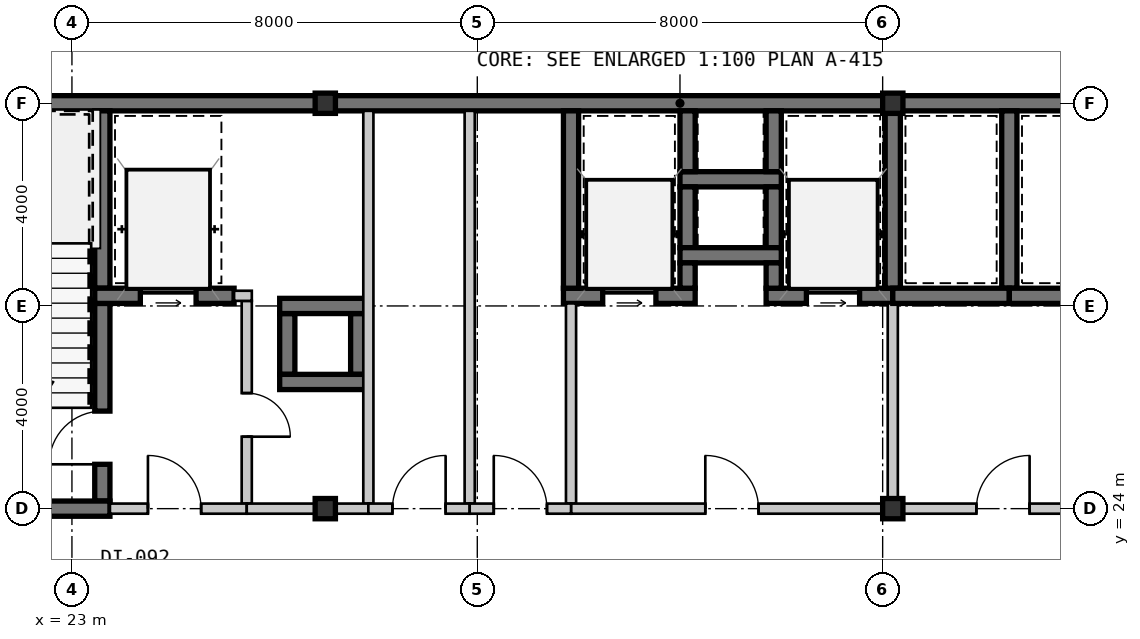
"""IFC4 building model, lengths in metres.
Left out: names, types, materials, properties, quantities, classifications, styles, units other than length and angle.
Written with IfcOpenShell. Run it as: python <this file> out.ifc"""

import sys

from ifc_helpers import new_model, si_unit, direction, frame, frame_2d, origin, origin_2d, place, context, subcontext, project, spatial, rectangle, hollow_rectangle, extrude, source, transform, mapped, element, fill, save


model = new_model("IFC4")
c1 = context("Model", 3, precision=1e-05, world=origin(), true_north=direction((0.0, 1.0)))
c2 = subcontext(c1, "Body", "Model", "MODEL_VIEW")
j1 = project(units=[si_unit("LENGTHUNIT", "METRE"), si_unit("PLANEANGLEUNIT", "RADIAN")], contexts=[c1])
p1 = place(None, origin())
s1 = spatial("IfcSite", under=j1, at=p1, CompositionType="ELEMENT")
p2 = place(p1, origin())
s2 = spatial("IfcBuilding", under=s1, at=p2, CompositionType="ELEMENT")
p3 = place(p2, frame((0.0, 0.0, 151.9)))
s3 = spatial("IfcBuildingStorey", under=s2, at=p3, CompositionType="ELEMENT", Elevation=151.9)
m1 = source(origin(), c2, "Body", "SweptSolid", [
    extrude(hollow_rectangle(XDim=0.4, YDim=0.4, WallThickness=0.016, at=origin_2d()), origin(), (0.0, 0.0, 1.0), 3.15),
])
for number, where, z_axis, x_axis in (
    (1, (28.0, 24.0, 0.0), (0.0, 0.0, 1.0), (1.0, 0.0, 0.0)),
    (2, (39.2, 24.0, 0.0), (0.0, 0.0, 1.0), (1.0, 0.0, 0.0)),
    (3, (28.0, 32.0, 0.0), (0.0, 0.0, 1.0), (1.0, 0.0, 0.0)),
    (4, (39.2, 32.0, 0.0), (0.0, 0.0, 1.0), (1.0, 0.0, 0.0)),
):
    element("IfcColumn", number, at=place(p3, frame(where, z_axis=z_axis, x_axis=x_axis)), inside=s3, PredefinedType="COLUMN", context=c2, shape_type="MappedRepresentation", body=[
        mapped(m1, transform((0.0, 0.0, 0.0), scale=1.0)),
    ])
m2 = source(origin(), c2, "Body", "SweptSolid", [
    extrude(rectangle(XDim=9.15, YDim=0.3, at=frame_2d((4.575, 0.0))), origin(), (0.0, 0.0, 1.0), 2.93),
])
p4 = place(p3, frame((18.85, 32.0, 0.0), z_axis=(0.0, 0.0, 1.0), x_axis=(1.0, 0.0, 0.0)))
e5 = element("IfcWall", 5, at=p4, inside=s3, PredefinedType="SHEAR", context=c2, shape_type="MappedRepresentation", body=[
    mapped(m2, transform((0.0, 0.0, 0.0), scale=1.0)),
])
m3 = source(origin(), c2, "Body", "SweptSolid", [
    extrude(rectangle(XDim=11.2, YDim=0.3, at=frame_2d((5.6, 0.0))), origin(), (0.0, 0.0, 1.0), 2.93),
])
p5 = place(p3, frame((28.0, 32.0, 0.0), z_axis=(0.0, 0.0, 1.0), x_axis=(1.0, 0.0, 0.0)))
e6 = element("IfcWall", 6, at=p5, inside=s3, PredefinedType="SHEAR", context=c2, shape_type="MappedRepresentation", body=[
    mapped(m3, transform((0.0, 0.0, 0.0), scale=1.0)),
])
m4 = source(origin(), c2, "Body", "SweptSolid", [
    extrude(rectangle(XDim=11.95, YDim=0.3, at=frame_2d((5.975, 0.0))), origin(), (0.0, 0.0, 1.0), 2.93),
])
p6 = place(p3, frame((39.2, 32.0, 0.0), z_axis=(0.0, 0.0, 1.0), x_axis=(1.0, 0.0, 0.0)))
e7 = element("IfcWall", 7, at=p6, inside=s3, PredefinedType="SHEAR", context=c2, shape_type="MappedRepresentation", body=[
    mapped(m4, transform((0.0, 0.0, 0.0), scale=1.0)),
])
m5 = source(origin(), c2, "Body", "SweptSolid", [
    extrude(rectangle(XDim=3.5, YDim=0.3, at=frame_2d((1.75, 0.0))), origin(), (0.0, 0.0, 1.0), 2.93),
])
p7 = place(p3, frame((23.6, 28.35, 0.0), z_axis=(0.0, 0.0, 1.0), x_axis=(0.0, 1.0, 0.0)))
e8 = element("IfcWall", 8, at=p7, inside=s3, PredefinedType="SHEAR", context=c2, shape_type="MappedRepresentation", body=[
    mapped(m5, transform((0.0, 0.0, 0.0), scale=1.0)),
])
m6 = source(origin(), c2, "Body", "SweptSolid", [
    extrude(rectangle(XDim=3.9, YDim=0.3, at=frame_2d((1.95, 0.0))), origin(), (0.0, 0.0, 1.0), 2.93),
])
p8 = place(p3, frame((23.6, 24.15, 0.0), z_axis=(0.0, 0.0, 1.0), x_axis=(0.0, 1.0, 0.0)))
e9 = element("IfcWall", 9, at=p8, inside=s3, PredefinedType="SHEAR", context=c2, shape_type="MappedRepresentation", body=[
    mapped(m6, transform((0.0, 0.0, 0.0), scale=1.0)),
])
m7 = source(origin(), c2, "Body", "SweptSolid", [
    extrude(rectangle(XDim=1.05, YDim=2.1, at=frame_2d((0.525, 1.05))), frame((0.0, 0.16, 0.0), z_axis=(0.0, -1.0, 0.0), x_axis=(1.0, 0.0, 0.0)), (0.0, 0.0, 1.0), 0.32),
])
p9 = place(p8, frame((0.725, 0.0, 0.0)))
e10 = element("IfcOpeningElement", 10, at=p9, cuts=e9, PredefinedType="OPENING", context=c2, shape_type="MappedRepresentation", body=[
    mapped(m7, transform((0.0, 0.0, 0.0), scale=1.0)),
])
m8 = source(origin(), c2, "Body", "SweptSolid", [
    extrude(rectangle(XDim=4.9, YDim=0.3, at=frame_2d((2.45, 0.0))), origin(), (0.0, 0.0, 1.0), 2.93),
])
p10 = place(p3, frame((18.85, 24.0, 0.0), z_axis=(0.0, 0.0, 1.0), x_axis=(1.0, 0.0, 0.0)))
e11 = element("IfcWall", 11, at=p10, inside=s3, PredefinedType="SHEAR", context=c2, shape_type="MappedRepresentation", body=[
    mapped(m8, transform((0.0, 0.0, 0.0), scale=1.0)),
])
m9 = source(origin(), c2, "Body", "SweptSolid", [
    extrude(rectangle(XDim=2.75, YDim=0.3, at=frame_2d((1.375, 0.0))), origin(), (0.0, 0.0, 1.0), 2.93),
])
p11 = place(p3, frame((23.45, 28.2, 0.0), z_axis=(0.0, 0.0, 1.0), x_axis=(1.0, 0.0, 0.0)))
e12 = element("IfcWall", 12, at=p11, inside=s3, PredefinedType="SHEAR", context=c2, shape_type="MappedRepresentation", body=[
    mapped(m9, transform((0.0, 0.0, 0.0), scale=1.0)),
])
m10 = source(origin(), c2, "Body", "SweptSolid", [
    extrude(rectangle(XDim=1.1, YDim=2.15, at=frame_2d((0.55, 1.075))), frame((0.0, 0.16, 0.0), z_axis=(0.0, -1.0, 0.0), x_axis=(1.0, 0.0, 0.0)), (0.0, 0.0, 1.0), 0.32),
])
p12 = place(p11, frame((0.9, 0.0, 0.0)))
e13 = element("IfcOpeningElement", 13, at=p12, cuts=e12, PredefinedType="OPENING", context=c2, shape_type="MappedRepresentation", body=[
    mapped(m10, transform((0.0, 0.0, 0.0), scale=1.0)),
])
m11 = source(origin(), c2, "Body", "SweptSolid", [
    extrude(rectangle(XDim=4.0, YDim=0.2, at=frame_2d((2.0, 0.0))), origin(), (0.0, 0.0, 1.0), 2.93),
])
p13 = place(p3, frame((26.45, 24.1, 0.0), z_axis=(0.0, 0.0, 1.0), x_axis=(0.0, 1.0, 0.0)))
e14 = element("IfcWall", 14, at=p13, inside=s3, PredefinedType="SOLIDWALL", context=c2, shape_type="MappedRepresentation", body=[
    mapped(m11, transform((0.0, 0.0, 0.0), scale=1.0)),
])
m12 = source(origin(), c2, "Body", "SweptSolid", [
    extrude(rectangle(XDim=0.86, YDim=2.1, at=frame_2d((0.43, 1.05))), frame((0.0, 0.11, 0.0), z_axis=(0.0, -1.0, 0.0), x_axis=(1.0, 0.0, 0.0)), (0.0, 0.0, 1.0), 0.22),
])
p14 = place(p13, frame((1.32, 0.0, 0.0)))
e15 = element("IfcOpeningElement", 15, at=p14, cuts=e14, PredefinedType="OPENING", context=c2, shape_type="MappedRepresentation", body=[
    mapped(m12, transform((0.0, 0.0, 0.0), scale=1.0)),
])
m13 = source(origin(), c2, "Body", "SweptSolid", [
    extrude(rectangle(XDim=2.7, YDim=0.2, at=frame_2d((1.35, 0.0))), origin(), (0.0, 0.0, 1.0), 2.47),
])
p15 = place(p3, frame((23.75, 24.0, 0.0), z_axis=(0.0, 0.0, 1.0), x_axis=(1.0, 0.0, 0.0)))
e16 = element("IfcWall", 16, at=p15, inside=s3, PredefinedType="SOLIDWALL", context=c2, shape_type="MappedRepresentation", body=[
    mapped(m13, transform((0.0, 0.0, 0.0), scale=1.0)),
])
m14 = source(origin(), c2, "Body", "SweptSolid", [
    extrude(rectangle(XDim=1.05, YDim=2.1, at=frame_2d((0.525, 1.05))), frame((0.0, 0.11, 0.0), z_axis=(0.0, -1.0, 0.0), x_axis=(1.0, 0.0, 0.0)), (0.0, 0.0, 1.0), 0.22),
])
p16 = place(p15, frame((0.75, 0.0, 0.0)))
e17 = element("IfcOpeningElement", 17, at=p16, cuts=e16, PredefinedType="OPENING", context=c2, shape_type="MappedRepresentation", body=[
    mapped(m14, transform((0.0, 0.0, 0.0), scale=1.0)),
])
m15 = source(origin(), c2, "Body", "SweptSolid", [
    extrude(rectangle(XDim=2.0, YDim=0.3, at=frame_2d((1.0, 0.0))), origin(), (0.0, 0.0, 1.0), 2.93),
])
p17 = place(p3, frame((35.0, 30.5, 0.0), z_axis=(0.0, 0.0, 1.0), x_axis=(1.0, 0.0, 0.0)))
e18 = element("IfcWall", 18, at=p17, inside=s3, PredefinedType="SHEAR", context=c2, shape_type="MappedRepresentation", body=[
    mapped(m15, transform((0.0, 0.0, 0.0), scale=1.0)),
])
m16 = source(origin(), c2, "Body", "SweptSolid", [
    extrude(rectangle(XDim=1.2, YDim=0.3, at=frame_2d((0.6, 0.0))), origin(), (0.0, 0.0, 1.0), 2.93),
])
for number, where, z_axis, x_axis in (
    (19, (35.15, 31.85, 0.0), (0.0, 0.0, 1.0), (0.0, -1.0, 0.0)),
    (20, (36.85, 30.65, 0.0), (0.0, 0.0, 1.0), (0.0, 1.0, 0.0)),
    (21, (35.15, 30.35, 0.0), (0.0, 0.0, 1.0), (0.0, -1.0, 0.0)),
    (22, (36.85, 29.15, 0.0), (0.0, 0.0, 1.0), (0.0, 1.0, 0.0)),
):
    element("IfcWall", number, at=place(p3, frame(where, z_axis=z_axis, x_axis=x_axis)), inside=s3, PredefinedType="SHEAR", context=c2, shape_type="MappedRepresentation", body=[
        mapped(m16, transform((0.0, 0.0, 0.0), scale=1.0)),
    ])
p18 = place(p3, frame((35.0, 29.0, 0.0), z_axis=(0.0, 0.0, 1.0), x_axis=(1.0, 0.0, 0.0)))
e23 = element("IfcWall", 23, at=p18, inside=s3, PredefinedType="SHEAR", context=c2, shape_type="MappedRepresentation", body=[
    mapped(m15, transform((0.0, 0.0, 0.0), scale=1.0)),
])
for number, where, z_axis, x_axis in (
    (24, (28.65, 26.65, 0.0), (0.0, 0.0, 1.0), (0.0, 1.0, 0.0)),
    (25, (27.25, 27.85, 0.0), (0.0, 0.0, 1.0), (0.0, -1.0, 0.0)),
):
    element("IfcWall", number, at=place(p3, frame(where, z_axis=z_axis, x_axis=x_axis)), inside=s3, PredefinedType="SHEAR", context=c2, shape_type="MappedRepresentation", body=[
        mapped(m16, transform((0.0, 0.0, 0.0), scale=1.0)),
    ])
m17 = source(origin(), c2, "Body", "SweptSolid", [
    extrude(rectangle(XDim=1.7, YDim=0.3, at=frame_2d((0.85, 0.0))), origin(), (0.0, 0.0, 1.0), 2.93),
])
for number, where, z_axis, x_axis in (
    (26, (28.8, 28.0, 0.0), (0.0, 0.0, 1.0), (-1.0, 0.0, 0.0)),
    (27, (27.1, 26.5, 0.0), (0.0, 0.0, 1.0), (1.0, 0.0, 0.0)),
):
    element("IfcWall", number, at=place(p3, frame(where, z_axis=z_axis, x_axis=x_axis)), inside=s3, PredefinedType="SHEAR", context=c2, shape_type="MappedRepresentation", body=[
        mapped(m17, transform((0.0, 0.0, 0.0), scale=1.0)),
    ])
m18 = source(origin(), c2, "Body", "SweptSolid", [
    extrude(rectangle(XDim=2.6, YDim=0.3, at=frame_2d((1.3, 0.0))), origin(), (0.0, 0.0, 1.0), 2.93),
])
p19 = place(p3, frame((32.7, 28.2, 0.0), z_axis=(0.0, 0.0, 1.0), x_axis=(1.0, 0.0, 0.0)))
e28 = element("IfcWall", 28, at=p19, inside=s3, PredefinedType="SHEAR", context=c2, shape_type="MappedRepresentation", body=[
    mapped(m18, transform((0.0, 0.0, 0.0), scale=1.0)),
])
m19 = source(origin(), c2, "Body", "SweptSolid", [
    extrude(rectangle(XDim=1.05, YDim=2.15, at=frame_2d((0.525, 1.075))), frame((0.0, 0.16, 0.0), z_axis=(0.0, -1.0, 0.0), x_axis=(1.0, 0.0, 0.0)), (0.0, 0.0, 1.0), 0.32),
])
p20 = place(p19, frame((0.775, 0.0, 0.0)))
e29 = element("IfcOpeningElement", 29, at=p20, cuts=e28, PredefinedType="OPENING", context=c2, shape_type="MappedRepresentation", body=[
    mapped(m19, transform((0.0, 0.0, 0.0), scale=1.0)),
])
m20 = source(origin(), c2, "Body", "SweptSolid", [
    extrude(rectangle(XDim=0.5, YDim=0.3, at=frame_2d((0.25, 0.0))), origin(), (0.0, 0.0, 1.0), 2.93),
])
p21 = place(p3, frame((35.15, 28.35, 0.0), z_axis=(0.0, 0.0, 1.0), x_axis=(0.0, 1.0, 0.0)))
e30 = element("IfcWall", 30, at=p21, inside=s3, PredefinedType="SHEAR", context=c2, shape_type="MappedRepresentation", body=[
    mapped(m20, transform((0.0, 0.0, 0.0), scale=1.0)),
])
p22 = place(p3, frame((32.85, 31.85, 0.0), z_axis=(0.0, 0.0, 1.0), x_axis=(0.0, -1.0, 0.0)))
e31 = element("IfcWall", 31, at=p22, inside=s3, PredefinedType="SHEAR", context=c2, shape_type="MappedRepresentation", body=[
    mapped(m5, transform((0.0, 0.0, 0.0), scale=1.0)),
])
m21 = source(origin(), c2, "Body", "SweptSolid", [
    extrude(rectangle(XDim=2.5, YDim=0.3, at=frame_2d((1.25, 0.0))), origin(), (0.0, 0.0, 1.0), 2.93),
])
p23 = place(p3, frame((36.7, 28.2, 0.0), z_axis=(0.0, 0.0, 1.0), x_axis=(1.0, 0.0, 0.0)))
e32 = element("IfcWall", 32, at=p23, inside=s3, PredefinedType="SHEAR", context=c2, shape_type="MappedRepresentation", body=[
    mapped(m21, transform((0.0, 0.0, 0.0), scale=1.0)),
])
p24 = place(p23, frame((0.795, 0.0, 0.0)))
e33 = element("IfcOpeningElement", 33, at=p24, cuts=e32, PredefinedType="OPENING", context=c2, shape_type="MappedRepresentation", body=[
    mapped(m19, transform((0.0, 0.0, 0.0), scale=1.0)),
])
p25 = place(p3, frame((36.85, 28.85, 0.0), z_axis=(0.0, 0.0, 1.0), x_axis=(0.0, -1.0, 0.0)))
e34 = element("IfcWall", 34, at=p25, inside=s3, PredefinedType="SHEAR", context=c2, shape_type="MappedRepresentation", body=[
    mapped(m20, transform((0.0, 0.0, 0.0), scale=1.0)),
])
p26 = place(p3, frame((39.2, 28.35, 0.0), z_axis=(0.0, 0.0, 1.0), x_axis=(0.0, 1.0, 0.0)))
e35 = element("IfcWall", 35, at=p26, inside=s3, PredefinedType="SHEAR", context=c2, shape_type="MappedRepresentation", body=[
    mapped(m5, transform((0.0, 0.0, 0.0), scale=1.0)),
])
m22 = source(origin(), c2, "Body", "SweptSolid", [
    extrude(rectangle(XDim=3.95, YDim=0.2, at=frame_2d((1.975, 0.0))), origin(), (0.0, 0.0, 1.0), 2.93),
])
p27 = place(p3, frame((32.85, 24.1, 0.0), z_axis=(0.0, 0.0, 1.0), x_axis=(0.0, 1.0, 0.0)))
e36 = element("IfcWall", 36, at=p27, inside=s3, PredefinedType="SOLIDWALL", context=c2, shape_type="MappedRepresentation", body=[
    mapped(m22, transform((0.0, 0.0, 0.0), scale=1.0)),
])
m23 = source(origin(), c2, "Body", "SweptSolid", [
    extrude(rectangle(XDim=3.95, YDim=0.2, at=frame_2d((1.975, 0.0))), origin(), (0.0, 0.0, 1.0), 2.47),
])
p28 = place(p3, frame((39.2, 28.05, 0.0), z_axis=(0.0, 0.0, 1.0), x_axis=(0.0, -1.0, 0.0)))
e37 = element("IfcWall", 37, at=p28, inside=s3, PredefinedType="SOLIDWALL", context=c2, shape_type="MappedRepresentation", body=[
    mapped(m23, transform((0.0, 0.0, 0.0), scale=1.0)),
])
m24 = source(origin(), c2, "Body", "SweptSolid", [
    extrude(rectangle(XDim=6.35, YDim=0.2, at=frame_2d((3.175, 0.0))), origin(), (0.0, 0.0, 1.0), 2.47),
])
p29 = place(p3, frame((39.2, 24.0, 0.0), z_axis=(0.0, 0.0, 1.0), x_axis=(-1.0, 0.0, 0.0)))
e38 = element("IfcWall", 38, at=p29, inside=s3, PredefinedType="SOLIDWALL", context=c2, shape_type="MappedRepresentation", body=[
    mapped(m24, transform((0.0, 0.0, 0.0), scale=1.0)),
])
p30 = place(p29, frame((2.65, 0.0, 0.0)))
e39 = element("IfcOpeningElement", 39, at=p30, cuts=e38, PredefinedType="OPENING", context=c2, shape_type="MappedRepresentation", body=[
    mapped(m14, transform((0.0, 0.0, 0.0), scale=1.0)),
])
p31 = place(p3, frame((41.5, 28.35, 0.0), z_axis=(0.0, 0.0, 1.0), x_axis=(0.0, 1.0, 0.0)))
e40 = element("IfcWall", 40, at=p31, inside=s3, PredefinedType="SHEAR", context=c2, shape_type="MappedRepresentation", body=[
    mapped(m5, transform((0.0, 0.0, 0.0), scale=1.0)),
])
m25 = source(origin(), c2, "Body", "SweptSolid", [
    extrude(rectangle(XDim=2.3, YDim=0.3, at=frame_2d((1.15, 0.0))), origin(), (0.0, 0.0, 1.0), 2.93),
])
p32 = place(p3, frame((39.2, 28.2, 0.0), z_axis=(0.0, 0.0, 1.0), x_axis=(1.0, 0.0, 0.0)))
e41 = element("IfcWall", 41, at=p32, inside=s3, PredefinedType="SHEAR", context=c2, shape_type="MappedRepresentation", body=[
    mapped(m25, transform((0.0, 0.0, 0.0), scale=1.0)),
])
m26 = source(origin(), c2, "Body", "SweptSolid", [
    extrude(rectangle(XDim=2.07, YDim=0.3, at=frame_2d((1.035, 0.0))), origin(), (0.0, 0.0, 1.0), 2.93),
])
p33 = place(p3, frame((41.5, 28.2, 0.0), z_axis=(0.0, 0.0, 1.0), x_axis=(1.0, 0.0, 0.0)))
e42 = element("IfcWall", 42, at=p33, inside=s3, PredefinedType="SHEAR", context=c2, shape_type="MappedRepresentation", body=[
    mapped(m26, transform((0.0, 0.0, 0.0), scale=1.0)),
])
m27 = source(origin(), c2, "Body", "SweptSolid", [
    extrude(rectangle(XDim=7.75, YDim=0.2, at=frame_2d((3.875, 0.0))), origin(), (0.0, 0.0, 1.0), 2.93),
])
p34 = place(p3, frame((28.85, 31.85, 0.0), z_axis=(0.0, 0.0, 1.0), x_axis=(0.0, -1.0, 0.0)))
e43 = element("IfcWall", 43, at=p34, inside=s3, PredefinedType="SOLIDWALL", context=c2, shape_type="MappedRepresentation", body=[
    mapped(m27, transform((0.0, 0.0, 0.0), scale=1.0)),
])
m28 = source(origin(), c2, "Body", "SweptSolid", [
    extrude(rectangle(XDim=2.4, YDim=0.2, at=frame_2d((1.2, 0.0))), origin(), (0.0, 0.0, 1.0), 2.47),
])
p35 = place(p3, frame((28.85, 24.0, 0.0), z_axis=(0.0, 0.0, 1.0), x_axis=(-1.0, 0.0, 0.0)))
e44 = element("IfcWall", 44, at=p35, inside=s3, PredefinedType="SOLIDWALL", context=c2, shape_type="MappedRepresentation", body=[
    mapped(m28, transform((0.0, 0.0, 0.0), scale=1.0)),
])
p36 = place(p3, frame((30.85, 31.85, 0.0), z_axis=(0.0, 0.0, 1.0), x_axis=(0.0, -1.0, 0.0)))
e45 = element("IfcWall", 45, at=p36, inside=s3, PredefinedType="SOLIDWALL", context=c2, shape_type="MappedRepresentation", body=[
    mapped(m27, transform((0.0, 0.0, 0.0), scale=1.0)),
])
m29 = source(origin(), c2, "Body", "SweptSolid", [
    extrude(rectangle(XDim=2.0, YDim=0.2, at=frame_2d((1.0, 0.0))), origin(), (0.0, 0.0, 1.0), 2.47),
])
p37 = place(p3, frame((30.85, 24.0, 0.0), z_axis=(0.0, 0.0, 1.0), x_axis=(-1.0, 0.0, 0.0)))
e46 = element("IfcWall", 46, at=p37, inside=s3, PredefinedType="SOLIDWALL", context=c2, shape_type="MappedRepresentation", body=[
    mapped(m29, transform((0.0, 0.0, 0.0), scale=1.0)),
])
p38 = place(p37, frame((0.475, 0.0, 0.0)))
e47 = element("IfcOpeningElement", 47, at=p38, cuts=e46, PredefinedType="OPENING", context=c2, shape_type="MappedRepresentation", body=[
    mapped(m14, transform((0.0, 0.0, 0.0), scale=1.0)),
])
p39 = place(p3, frame((32.85, 24.0, 0.0), z_axis=(0.0, 0.0, 1.0), x_axis=(-1.0, 0.0, 0.0)))
e48 = element("IfcWall", 48, at=p39, inside=s3, PredefinedType="SOLIDWALL", context=c2, shape_type="MappedRepresentation", body=[
    mapped(m29, transform((0.0, 0.0, 0.0), scale=1.0)),
])
p40 = place(p39, frame((0.475, 0.0, 0.0)))
e49 = element("IfcOpeningElement", 49, at=p40, cuts=e48, PredefinedType="OPENING", context=c2, shape_type="MappedRepresentation", body=[
    mapped(m14, transform((0.0, 0.0, 0.0), scale=1.0)),
])
m30 = source(origin(), c2, "Body", "SweptSolid", [
    extrude(rectangle(XDim=4.35, YDim=0.2, at=frame_2d((2.175, 0.0))), origin(), (0.0, 0.0, 1.0), 2.397),
])
p41 = place(p3, frame((43.55, 24.0, 0.0), z_axis=(0.0, 0.0, 1.0), x_axis=(-1.0, 0.0, 0.0)))
e50 = element("IfcWall", 50, at=p41, inside=s3, PredefinedType="SOLIDWALL", context=c2, shape_type="MappedRepresentation", body=[
    mapped(m30, transform((0.0, 0.0, 0.0), scale=1.0)),
])
p42 = place(p41, frame((1.65, 0.0, 0.0)))
e51 = element("IfcOpeningElement", 51, at=p42, cuts=e50, PredefinedType="OPENING", context=c2, shape_type="MappedRepresentation", body=[
    mapped(m14, transform((0.0, 0.0, 0.0), scale=1.0)),
])
m31 = source(origin(), c2, "Body", "SweptSolid", [
    extrude(rectangle(XDim=0.35, YDim=0.2, at=frame_2d((0.175, 0.0))), origin(), (0.0, 0.0, 1.0), 2.93),
])
p43 = place(p3, frame((26.2, 28.2, 0.0), z_axis=(0.0, 0.0, 1.0), x_axis=(1.0, 0.0, 0.0)))
e52 = element("IfcWall", 52, at=p43, inside=s3, PredefinedType="SOLIDWALL", context=c2, shape_type="MappedRepresentation", body=[
    mapped(m31, transform((0.0, 0.0, 0.0), scale=1.0)),
])
m32 = source(origin(), c2, "Body", "SweptSolid", [
    extrude(rectangle(XDim=1.05, YDim=2.1, at=frame_2d((0.525, 1.05))), frame((0.0, 0.025, 0.0), z_axis=(0.0, -1.0, 0.0), x_axis=(1.0, 0.0, 0.0)), (0.0, 0.0, 1.0), 0.05),
])
p44 = place(p9, origin())
e53 = element("IfcDoor", 53, at=p44, inside=s3, OperationType="SINGLE_SWING_LEFT", PredefinedType="DOOR", context=c2, shape_type="MappedRepresentation", body=[
    mapped(m32, transform((0.0, 0.0, 0.0), scale=1.0)),
])
fill(e10, e53)
m33 = source(origin(), c2, "Body", "SweptSolid", [
    extrude(rectangle(XDim=1.1, YDim=2.15, at=frame_2d((0.55, 1.075))), frame((0.0, 0.025, 0.0), z_axis=(0.0, -1.0, 0.0), x_axis=(1.0, 0.0, 0.0)), (0.0, 0.0, 1.0), 0.05),
])
p45 = place(p12, origin())
e54 = element("IfcDoor", 54, at=p45, inside=s3, OperationType="SLIDING_TO_LEFT", PredefinedType="DOOR", context=c2, shape_type="MappedRepresentation", body=[
    mapped(m33, transform((0.0, 0.0, 0.0), scale=1.0)),
])
fill(e13, e54)
p46 = place(p16, origin())
e55 = element("IfcDoor", 55, at=p46, inside=s3, OperationType="SINGLE_SWING_LEFT", PredefinedType="DOOR", context=c2, shape_type="MappedRepresentation", body=[
    mapped(m32, transform((0.0, 0.0, 0.0), scale=1.0)),
])
fill(e17, e55)
m34 = source(origin(), c2, "Body", "SweptSolid", [
    extrude(rectangle(XDim=1.05, YDim=2.15, at=frame_2d((0.525, 1.075))), frame((0.0, 0.025, 0.0), z_axis=(0.0, -1.0, 0.0), x_axis=(1.0, 0.0, 0.0)), (0.0, 0.0, 1.0), 0.05),
])
p47 = place(p20, origin())
e56 = element("IfcDoor", 56, at=p47, inside=s3, OperationType="SLIDING_TO_LEFT", PredefinedType="DOOR", context=c2, shape_type="MappedRepresentation", body=[
    mapped(m34, transform((0.0, 0.0, 0.0), scale=1.0)),
])
fill(e29, e56)
p48 = place(p24, origin())
e57 = element("IfcDoor", 57, at=p48, inside=s3, OperationType="SLIDING_TO_LEFT", PredefinedType="DOOR", context=c2, shape_type="MappedRepresentation", body=[
    mapped(m34, transform((0.0, 0.0, 0.0), scale=1.0)),
])
fill(e33, e57)
p49 = place(p30, frame((1.05, 0.0, 0.0), z_axis=(0.0, 0.0, 1.0), x_axis=(-1.0, 0.0, 0.0)))
e58 = element("IfcDoor", 58, at=p49, inside=s3, OperationType="SINGLE_SWING_LEFT", PredefinedType="DOOR", context=c2, shape_type="MappedRepresentation", body=[
    mapped(m32, transform((0.0, 0.0, 0.0), scale=1.0)),
])
fill(e39, e58)
p50 = place(p38, frame((1.05, 0.0, 0.0), z_axis=(0.0, 0.0, 1.0), x_axis=(-1.0, 0.0, 0.0)))
e59 = element("IfcDoor", 59, at=p50, inside=s3, OperationType="SINGLE_SWING_RIGHT", PredefinedType="DOOR", context=c2, shape_type="MappedRepresentation", body=[
    mapped(m32, transform((0.0, 0.0, 0.0), scale=1.0)),
])
fill(e47, e59)
p51 = place(p40, frame((1.05, 0.0, 0.0), z_axis=(0.0, 0.0, 1.0), x_axis=(-1.0, 0.0, 0.0)))
e60 = element("IfcDoor", 60, at=p51, inside=s3, OperationType="SINGLE_SWING_LEFT", PredefinedType="DOOR", context=c2, shape_type="MappedRepresentation", body=[
    mapped(m32, transform((0.0, 0.0, 0.0), scale=1.0)),
])
fill(e49, e60)
p52 = place(p42, frame((1.05, 0.0, 0.0), z_axis=(0.0, 0.0, 1.0), x_axis=(-1.0, 0.0, 0.0)))
e61 = element("IfcDoor", 61, at=p52, inside=s3, OperationType="SINGLE_SWING_RIGHT", PredefinedType="DOOR", context=c2, shape_type="MappedRepresentation", body=[
    mapped(m32, transform((0.0, 0.0, 0.0), scale=1.0)),
])
fill(e51, e61)
m35 = source(origin(), c2, "Body", "SweptSolid", [
    extrude(rectangle(XDim=0.86, YDim=2.1, at=frame_2d((0.43, 1.05))), frame((0.0, 0.025, 0.0), z_axis=(0.0, -1.0, 0.0), x_axis=(1.0, 0.0, 0.0)), (0.0, 0.0, 1.0), 0.05),
])
p53 = place(p14, frame((0.86, 0.0, 0.0), z_axis=(0.0, 0.0, 1.0), x_axis=(-1.0, 0.0, 0.0)))
e62 = element("IfcDoor", 62, at=p53, inside=s3, OperationType="SINGLE_SWING_RIGHT", PredefinedType="DOOR", context=c2, shape_type="MappedRepresentation", body=[
    mapped(m35, transform((0.0, 0.0, 0.0), scale=1.0)),
])
fill(e15, e62)
save(model, sys.argv[1])
